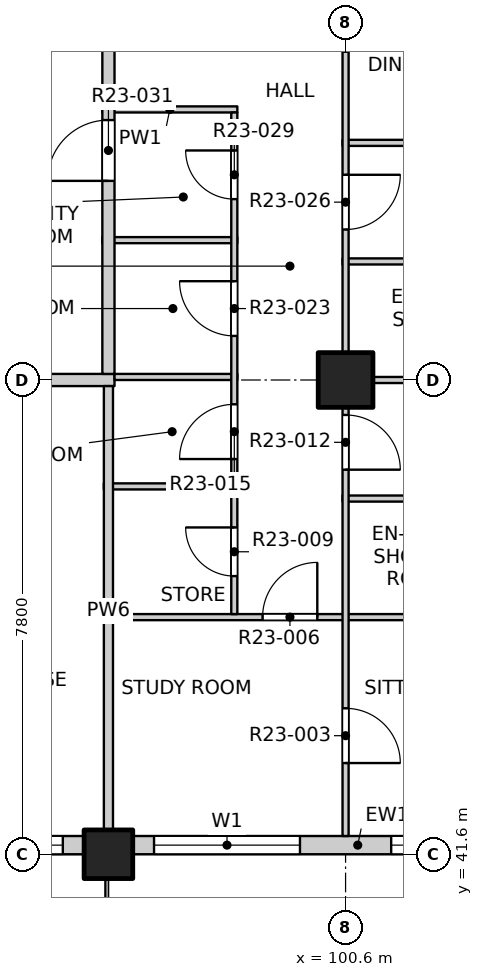
"""IFC4 building model, lengths in metres.
Left out: names, types, materials, properties, quantities, classifications, styles, units other than length and angle.
Written with IfcOpenShell. Run it as: python <this file> out.ifc"""

import sys

from ifc_helpers import new_model, si_unit, direction, frame, frame_2d, origin, origin_2d, place, context, subcontext, project, spatial, rectangle, extrude, element, fill, save


model = new_model("IFC4")
c1 = context("Model", 3, precision=1e-05, world=origin(), true_north=direction((0.0, 1.0)))
c2 = subcontext(c1, "Body", "Model", "MODEL_VIEW")
j1 = project(units=[si_unit("LENGTHUNIT", "METRE"), si_unit("PLANEANGLEUNIT", "RADIAN")], contexts=[c1])
p1 = place(None, origin())
s1 = spatial("IfcSite", under=j1, at=p1, CompositionType="ELEMENT")
p2 = place(p1, origin())
s2 = spatial("IfcBuilding", under=s1, at=p2, CompositionType="ELEMENT")
p3 = place(p2, frame((0.0, 0.0, 234.7)))
s3 = spatial("IfcBuildingStorey", under=s2, at=p3, CompositionType="ELEMENT", Elevation=234.7)
p4 = place(p3, frame((96.7, 41.6, -0.25), z_axis=(0.0, 0.0, 1.0), x_axis=(1.0, 0.0, 0.0)))
e1 = element("IfcColumn", 1, at=p4, inside=s3, PredefinedType="COLUMN", context=c2, shape_type="SweptSolid", body=[
    extrude(rectangle(XDim=0.8, YDim=0.8, at=origin_2d()), origin(), (0.0, 0.0, 1.0), 3.4),
])
p5 = place(p3, frame((100.6, 49.4, -0.25), z_axis=(0.0, 0.0, 1.0), x_axis=(1.0, 0.0, 0.0)))
e2 = element("IfcColumn", 2, at=p5, inside=s3, PredefinedType="COLUMN", context=c2, shape_type="SweptSolid", body=[
    extrude(rectangle(XDim=0.9, YDim=0.9, at=origin_2d()), origin(), (0.0, 0.0, 1.0), 3.4),
])
p6 = place(p3, frame((89.3, 41.75, 0.0), z_axis=(0.0, 0.0, 1.0), x_axis=(1.0, 0.0, 0.0)))
e3 = element("IfcWall", 3, at=p6, inside=s3, PredefinedType="SOLIDWALL", context=c2, shape_type="SweptSolid", body=[
    extrude(rectangle(XDim=7.0, YDim=0.3, at=frame_2d((3.5, 0.0))), origin(), (0.0, 0.0, 1.0), 2.7),
])
p7 = place(p6, frame((0.65, 0.0, 0.0)))
e4 = element("IfcOpeningElement", 4, at=p7, cuts=e3, PredefinedType="OPENING", context=c2, shape_type="SweptSolid", body=[
    extrude(rectangle(XDim=1.8, YDim=2.4, at=frame_2d((0.9, 1.2))), frame((0.0, 0.16, 0.0), z_axis=(0.0, -1.0, 0.0), x_axis=(1.0, 0.0, 0.0)), (0.0, 0.0, 1.0), 0.32),
])
p8 = place(p6, frame((4.25, 0.0, 0.9)))
e5 = element("IfcOpeningElement", 5, at=p8, cuts=e3, PredefinedType="OPENING", context=c2, shape_type="SweptSolid", body=[
    extrude(rectangle(XDim=2.4, YDim=1.8, at=frame_2d((1.2, 0.9))), frame((0.0, 0.16, 0.0), z_axis=(0.0, -1.0, 0.0), x_axis=(1.0, 0.0, 0.0)), (0.0, 0.0, 1.0), 0.32),
])
p9 = place(p3, frame((97.1, 41.75, 0.0), z_axis=(0.0, 0.0, 1.0), x_axis=(1.0, 0.0, 0.0)))
e6 = element("IfcWall", 6, at=p9, inside=s3, PredefinedType="SOLIDWALL", context=c2, shape_type="SweptSolid", body=[
    extrude(rectangle(XDim=7.4, YDim=0.3, at=frame_2d((3.7, 0.0))), origin(), (0.0, 0.0, 1.0), 2.7),
])
p10 = place(p9, frame((0.35, 0.0, 0.9)))
e7 = element("IfcOpeningElement", 7, at=p10, cuts=e6, PredefinedType="OPENING", context=c2, shape_type="SweptSolid", body=[
    extrude(rectangle(XDim=2.4, YDim=1.8, at=frame_2d((1.2, 0.9))), frame((0.0, 0.16, 0.0), z_axis=(0.0, -1.0, 0.0), x_axis=(1.0, 0.0, 0.0)), (0.0, 0.0, 1.0), 0.32),
])
p11 = place(p9, frame((4.25, 0.0, 0.9)))
e8 = element("IfcOpeningElement", 8, at=p11, cuts=e6, PredefinedType="OPENING", context=c2, shape_type="SweptSolid", body=[
    extrude(rectangle(XDim=2.4, YDim=1.8, at=frame_2d((1.2, 0.9))), frame((0.0, 0.16, 0.0), z_axis=(0.0, -1.0, 0.0), x_axis=(1.0, 0.0, 0.0)), (0.0, 0.0, 1.0), 0.32),
])
p12 = place(p3, frame((96.625, 45.5, 0.0), z_axis=(0.0, 0.0, 1.0), x_axis=(1.0, 0.0, 0.0)))
e9 = element("IfcWall", 9, at=p12, inside=s3, PredefinedType="PARTITIONING", context=c2, shape_type="SweptSolid", body=[
    extrude(rectangle(XDim=11.475, YDim=0.1, at=frame_2d((5.738, 0.0))), origin(), (0.0, 0.0, 1.0), 3.15),
])
p13 = place(p12, frame((2.61, 0.0, 0.0)))
e10 = element("IfcOpeningElement", 10, at=p13, cuts=e9, PredefinedType="OPENING", context=c2, shape_type="SweptSolid", body=[
    extrude(rectangle(XDim=0.9, YDim=2.1, at=frame_2d((0.45, 1.05))), frame((0.0, 0.06, 0.0), z_axis=(0.0, -1.0, 0.0), x_axis=(1.0, 0.0, 0.0)), (0.0, 0.0, 1.0), 0.12),
])
p14 = place(p3, frame((100.55, 47.45, 0.0), z_axis=(0.0, 0.0, 1.0), x_axis=(1.0, 0.0, 0.0)))
e11 = element("IfcWall", 11, at=p14, inside=s3, PredefinedType="PARTITIONING", context=c2, shape_type="SweptSolid", body=[
    extrude(rectangle(XDim=3.7, YDim=0.1, at=frame_2d((1.85, 0.0))), origin(), (0.0, 0.0, 1.0), 3.15),
])
p15 = place(p3, frame((96.625, 47.65, 0.0), z_axis=(0.0, 0.0, 1.0), x_axis=(1.0, 0.0, 0.0)))
e12 = element("IfcWall", 12, at=p15, inside=s3, PredefinedType="PARTITIONING", context=c2, shape_type="SweptSolid", body=[
    extrude(rectangle(XDim=2.195, YDim=0.1, at=frame_2d((1.098, 0.0))), origin(), (0.0, 0.0, 1.0), 3.15),
])
p16 = place(p3, frame((73.2, 49.4, 0.0), z_axis=(0.0, 0.0, 1.0), x_axis=(1.0, 0.0, 0.0)))
e13 = element("IfcWall", 13, at=p16, inside=s3, PredefinedType="PARTITIONING", context=c2, shape_type="SweptSolid", body=[
    extrude(rectangle(XDim=23.6, YDim=0.2, at=frame_2d((11.8, 0.0))), origin(), (0.0, 0.0, 1.0), 3.15),
])
p17 = place(p16, frame((2.25, 0.0, 0.0)))
e14 = element("IfcOpeningElement", 14, at=p17, cuts=e13, PredefinedType="OPENING", context=c2, shape_type="SweptSolid", body=[
    extrude(rectangle(XDim=1.2, YDim=2.1, at=frame_2d((0.6, 1.05))), frame((0.0, 0.11, 0.0), z_axis=(0.0, -1.0, 0.0), x_axis=(1.0, 0.0, 0.0)), (0.0, 0.0, 1.0), 0.22),
])
p18 = place(p16, frame((9.4, 0.0, 0.0)))
e15 = element("IfcOpeningElement", 15, at=p18, cuts=e13, PredefinedType="OPENING", context=c2, shape_type="SweptSolid", body=[
    extrude(rectangle(XDim=0.9, YDim=2.1, at=frame_2d((0.45, 1.05))), frame((0.0, 0.11, 0.0), z_axis=(0.0, -1.0, 0.0), x_axis=(1.0, 0.0, 0.0)), (0.0, 0.0, 1.0), 0.22),
])
p19 = place(p16, frame((15.1, 0.0, 0.0)))
e16 = element("IfcOpeningElement", 16, at=p19, cuts=e13, PredefinedType="OPENING", context=c2, shape_type="SweptSolid", body=[
    extrude(rectangle(XDim=1.2, YDim=2.1, at=frame_2d((0.6, 1.05))), frame((0.0, 0.11, 0.0), z_axis=(0.0, -1.0, 0.0), x_axis=(1.0, 0.0, 0.0)), (0.0, 0.0, 1.0), 0.22),
])
p20 = place(p16, frame((21.1, 0.0, 0.0)))
e17 = element("IfcOpeningElement", 17, at=p20, cuts=e13, PredefinedType="OPENING", context=c2, shape_type="SweptSolid", body=[
    extrude(rectangle(XDim=0.9, YDim=2.1, at=frame_2d((0.45, 1.05))), frame((0.0, 0.11, 0.0), z_axis=(0.0, -1.0, 0.0), x_axis=(1.0, 0.0, 0.0)), (0.0, 0.0, 1.0), 0.22),
])
p21 = place(p3, frame((100.55, 49.4, 0.0), z_axis=(0.0, 0.0, 1.0), x_axis=(1.0, 0.0, 0.0)))
e18 = element("IfcWall", 18, at=p21, inside=s3, PredefinedType="PARTITIONING", context=c2, shape_type="SweptSolid", body=[
    extrude(rectangle(XDim=7.55, YDim=0.1, at=frame_2d((3.775, 0.0))), origin(), (0.0, 0.0, 1.0), 3.15),
])
p22 = place(p3, frame((96.8, 49.45, 0.0), z_axis=(0.0, 0.0, 1.0), x_axis=(1.0, 0.0, 0.0)))
e19 = element("IfcWall", 19, at=p22, inside=s3, PredefinedType="PARTITIONING", context=c2, shape_type="SweptSolid", body=[
    extrude(rectangle(XDim=2.02, YDim=0.1, at=frame_2d((1.01, 0.0))), origin(), (0.0, 0.0, 1.0), 3.15),
])
p23 = place(p3, frame((100.55, 51.35, 0.0), z_axis=(0.0, 0.0, 1.0), x_axis=(1.0, 0.0, 0.0)))
e20 = element("IfcWall", 20, at=p23, inside=s3, PredefinedType="PARTITIONING", context=c2, shape_type="SweptSolid", body=[
    extrude(rectangle(XDim=3.7, YDim=0.1, at=frame_2d((1.85, 0.0))), origin(), (0.0, 0.0, 1.0), 3.15),
])
p24 = place(p3, frame((96.6, 51.7, 0.0), z_axis=(0.0, 0.0, 1.0), x_axis=(1.0, 0.0, 0.0)))
e21 = element("IfcWall", 21, at=p24, inside=s3, PredefinedType="PARTITIONING", context=c2, shape_type="SweptSolid", body=[
    extrude(rectangle(XDim=2.22, YDim=0.1, at=frame_2d((1.11, 0.0))), origin(), (0.0, 0.0, 1.0), 3.15),
])
p25 = place(p3, frame((100.55, 53.3, 0.0), z_axis=(0.0, 0.0, 1.0), x_axis=(1.0, 0.0, 0.0)))
e22 = element("IfcWall", 22, at=p25, inside=s3, PredefinedType="PARTITIONING", context=c2, shape_type="SweptSolid", body=[
    extrude(rectangle(XDim=7.55, YDim=0.1, at=frame_2d((3.775, 0.0))), origin(), (0.0, 0.0, 1.0), 3.15),
])
p26 = place(p3, frame((96.6, 53.85, 0.0), z_axis=(0.0, 0.0, 1.0), x_axis=(1.0, 0.0, 0.0)))
e23 = element("IfcWall", 23, at=p26, inside=s3, PredefinedType="PARTITIONING", context=c2, shape_type="SweptSolid", body=[
    extrude(rectangle(XDim=2.22, YDim=0.1, at=frame_2d((1.11, 0.0))), origin(), (0.0, 0.0, 1.0), 3.15),
])
p27 = place(p3, frame((96.7, 41.9, 0.0), z_axis=(0.0, 0.0, 1.0), x_axis=(0.0, 1.0, 0.0)))
e24 = element("IfcWall", 24, at=p27, inside=s3, PredefinedType="PARTITIONING", context=c2, shape_type="SweptSolid", body=[
    extrude(rectangle(XDim=7.4, YDim=0.15, at=frame_2d((3.7, 0.0))), origin(), (0.0, 0.0, 1.0), 3.15),
])
p28 = place(p3, frame((96.7, 49.5, 0.0), z_axis=(0.0, 0.0, 1.0), x_axis=(0.0, 1.0, 0.0)))
e25 = element("IfcWall", 25, at=p28, inside=s3, PredefinedType="PARTITIONING", context=c2, shape_type="SweptSolid", body=[
    extrude(rectangle(XDim=34.9, YDim=0.2, at=frame_2d((17.45, 0.0))), origin(), (0.0, 0.0, 1.0), 3.15),
])
p29 = place(p28, frame((3.175, 0.0, 0.0)))
e26 = element("IfcOpeningElement", 26, at=p29, cuts=e25, PredefinedType="OPENING", context=c2, shape_type="SweptSolid", body=[
    extrude(rectangle(XDim=1.0, YDim=2.1, at=frame_2d((0.5, 1.05))), frame((0.0, 0.11, 0.0), z_axis=(0.0, -1.0, 0.0), x_axis=(1.0, 0.0, 0.0)), (0.0, 0.0, 1.0), 0.22),
])
p30 = place(p28, frame((14.625, 0.0, 0.0)))
e27 = element("IfcOpeningElement", 27, at=p30, cuts=e25, PredefinedType="OPENING", context=c2, shape_type="SweptSolid", body=[
    extrude(rectangle(XDim=1.0, YDim=2.1, at=frame_2d((0.5, 1.05))), frame((0.0, 0.11, 0.0), z_axis=(0.0, -1.0, 0.0), x_axis=(1.0, 0.0, 0.0)), (0.0, 0.0, 1.0), 0.22),
])
p31 = place(p28, frame((30.175, 0.0, 0.0)))
e28 = element("IfcOpeningElement", 28, at=p31, cuts=e25, PredefinedType="OPENING", context=c2, shape_type="SweptSolid", body=[
    extrude(rectangle(XDim=1.0, YDim=2.1, at=frame_2d((0.5, 1.05))), frame((0.0, 0.11, 0.0), z_axis=(0.0, -1.0, 0.0), x_axis=(1.0, 0.0, 0.0)), (0.0, 0.0, 1.0), 0.22),
])
p32 = place(p3, frame((98.77, 45.55, 0.0), z_axis=(0.0, 0.0, 1.0), x_axis=(0.0, 1.0, 0.0)))
e29 = element("IfcWall", 29, at=p32, inside=s3, PredefinedType="PARTITIONING", context=c2, shape_type="SweptSolid", body=[
    extrude(rectangle(XDim=8.25, YDim=0.1, at=frame_2d((4.125, 0.0))), origin(), (0.0, 0.0, 1.0), 3.15),
])
p33 = place(p32, frame((0.625, 0.0, 0.0)))
e30 = element("IfcOpeningElement", 30, at=p33, cuts=e29, PredefinedType="OPENING", context=c2, shape_type="SweptSolid", body=[
    extrude(rectangle(XDim=0.8, YDim=2.1, at=frame_2d((0.4, 1.05))), frame((0.0, 0.06, 0.0), z_axis=(0.0, -1.0, 0.0), x_axis=(1.0, 0.0, 0.0)), (0.0, 0.0, 1.0), 0.12),
])
p34 = place(p32, frame((2.55, 0.0, 0.0)))
e31 = element("IfcOpeningElement", 31, at=p34, cuts=e29, PredefinedType="OPENING", context=c2, shape_type="SweptSolid", body=[
    extrude(rectangle(XDim=0.9, YDim=2.1, at=frame_2d((0.45, 1.05))), frame((0.0, 0.06, 0.0), z_axis=(0.0, -1.0, 0.0), x_axis=(1.0, 0.0, 0.0)), (0.0, 0.0, 1.0), 0.12),
])
p35 = place(p32, frame((4.575, 0.0, 0.0)))
e32 = element("IfcOpeningElement", 32, at=p35, cuts=e29, PredefinedType="OPENING", context=c2, shape_type="SweptSolid", body=[
    extrude(rectangle(XDim=0.9, YDim=2.1, at=frame_2d((0.45, 1.05))), frame((0.0, 0.06, 0.0), z_axis=(0.0, -1.0, 0.0), x_axis=(1.0, 0.0, 0.0)), (0.0, 0.0, 1.0), 0.12),
])
p36 = place(p32, frame((6.825, 0.0, 0.0)))
e33 = element("IfcOpeningElement", 33, at=p36, cuts=e29, PredefinedType="OPENING", context=c2, shape_type="SweptSolid", body=[
    extrude(rectangle(XDim=0.8, YDim=2.1, at=frame_2d((0.4, 1.05))), frame((0.0, 0.06, 0.0), z_axis=(0.0, -1.0, 0.0), x_axis=(1.0, 0.0, 0.0)), (0.0, 0.0, 1.0), 0.12),
])
p37 = place(p3, frame((100.6, 41.9, 0.0), z_axis=(0.0, 0.0, 1.0), x_axis=(0.0, 1.0, 0.0)))
e34 = element("IfcWall", 34, at=p37, inside=s3, PredefinedType="PARTITIONING", context=c2, shape_type="SweptSolid", body=[
    extrude(rectangle(XDim=46.2, YDim=0.1, at=frame_2d((23.1, 0.0))), origin(), (0.0, 0.0, 1.0), 3.15),
])
p38 = place(p37, frame((1.2, 0.0, 0.0)))
e35 = element("IfcOpeningElement", 35, at=p38, cuts=e34, PredefinedType="OPENING", context=c2, shape_type="SweptSolid", body=[
    extrude(rectangle(XDim=0.9, YDim=2.1, at=frame_2d((0.45, 1.05))), frame((0.0, 0.06, 0.0), z_axis=(0.0, -1.0, 0.0), x_axis=(1.0, 0.0, 0.0)), (0.0, 0.0, 1.0), 0.12),
])
p39 = place(p37, frame((6.025, 0.0, 0.0)))
e36 = element("IfcOpeningElement", 36, at=p39, cuts=e34, PredefinedType="OPENING", context=c2, shape_type="SweptSolid", body=[
    extrude(rectangle(XDim=0.9, YDim=2.1, at=frame_2d((0.45, 1.05))), frame((0.0, 0.06, 0.0), z_axis=(0.0, -1.0, 0.0), x_axis=(1.0, 0.0, 0.0)), (0.0, 0.0, 1.0), 0.12),
])
p40 = place(p37, frame((9.975, 0.0, 0.0)))
e37 = element("IfcOpeningElement", 37, at=p40, cuts=e34, PredefinedType="OPENING", context=c2, shape_type="SweptSolid", body=[
    extrude(rectangle(XDim=0.9, YDim=2.1, at=frame_2d((0.45, 1.05))), frame((0.0, 0.06, 0.0), z_axis=(0.0, -1.0, 0.0), x_axis=(1.0, 0.0, 0.0)), (0.0, 0.0, 1.0), 0.12),
])
p41 = place(p37, frame((12.9, 0.0, 0.0)))
e38 = element("IfcOpeningElement", 38, at=p41, cuts=e34, PredefinedType="OPENING", context=c2, shape_type="SweptSolid", body=[
    extrude(rectangle(XDim=0.9, YDim=2.1, at=frame_2d((0.45, 1.05))), frame((0.0, 0.06, 0.0), z_axis=(0.0, -1.0, 0.0), x_axis=(1.0, 0.0, 0.0)), (0.0, 0.0, 1.0), 0.12),
])
p42 = place(p37, frame((17.775, 0.0, 0.0)))
e39 = element("IfcOpeningElement", 39, at=p42, cuts=e34, PredefinedType="OPENING", context=c2, shape_type="SweptSolid", body=[
    extrude(rectangle(XDim=0.9, YDim=2.1, at=frame_2d((0.45, 1.05))), frame((0.0, 0.06, 0.0), z_axis=(0.0, -1.0, 0.0), x_axis=(1.0, 0.0, 0.0)), (0.0, 0.0, 1.0), 0.12),
])
p43 = place(p37, frame((21.625, 0.0, 0.0)))
e40 = element("IfcOpeningElement", 40, at=p43, cuts=e34, PredefinedType="OPENING", context=c2, shape_type="SweptSolid", body=[
    extrude(rectangle(XDim=0.9, YDim=2.1, at=frame_2d((0.45, 1.05))), frame((0.0, 0.06, 0.0), z_axis=(0.0, -1.0, 0.0), x_axis=(1.0, 0.0, 0.0)), (0.0, 0.0, 1.0), 0.12),
])
p44 = place(p37, frame((25.575, 0.0, 0.0)))
e41 = element("IfcOpeningElement", 41, at=p44, cuts=e34, PredefinedType="OPENING", context=c2, shape_type="SweptSolid", body=[
    extrude(rectangle(XDim=0.9, YDim=2.1, at=frame_2d((0.45, 1.05))), frame((0.0, 0.06, 0.0), z_axis=(0.0, -1.0, 0.0), x_axis=(1.0, 0.0, 0.0)), (0.0, 0.0, 1.0), 0.12),
])
p45 = place(p37, frame((28.5, 0.0, 0.0)))
e42 = element("IfcOpeningElement", 42, at=p45, cuts=e34, PredefinedType="OPENING", context=c2, shape_type="SweptSolid", body=[
    extrude(rectangle(XDim=0.9, YDim=2.1, at=frame_2d((0.45, 1.05))), frame((0.0, 0.06, 0.0), z_axis=(0.0, -1.0, 0.0), x_axis=(1.0, 0.0, 0.0)), (0.0, 0.0, 1.0), 0.12),
])
p46 = place(p37, frame((33.375, 0.0, 0.0)))
e43 = element("IfcOpeningElement", 43, at=p46, cuts=e34, PredefinedType="OPENING", context=c2, shape_type="SweptSolid", body=[
    extrude(rectangle(XDim=0.9, YDim=2.1, at=frame_2d((0.45, 1.05))), frame((0.0, 0.06, 0.0), z_axis=(0.0, -1.0, 0.0), x_axis=(1.0, 0.0, 0.0)), (0.0, 0.0, 1.0), 0.12),
])
p47 = place(p37, frame((36.3, 0.0, 0.0)))
e44 = element("IfcOpeningElement", 44, at=p47, cuts=e34, PredefinedType="OPENING", context=c2, shape_type="SweptSolid", body=[
    extrude(rectangle(XDim=0.9, YDim=2.1, at=frame_2d((0.45, 1.05))), frame((0.0, 0.06, 0.0), z_axis=(0.0, -1.0, 0.0), x_axis=(1.0, 0.0, 0.0)), (0.0, 0.0, 1.0), 0.12),
])
p48 = place(p37, frame((40.2, 0.0, 0.0)))
e45 = element("IfcOpeningElement", 45, at=p48, cuts=e34, PredefinedType="OPENING", context=c2, shape_type="SweptSolid", body=[
    extrude(rectangle(XDim=0.9, YDim=2.1, at=frame_2d((0.45, 1.05))), frame((0.0, 0.06, 0.0), z_axis=(0.0, -1.0, 0.0), x_axis=(1.0, 0.0, 0.0)), (0.0, 0.0, 1.0), 0.12),
])
p49 = place(p37, frame((44.1, 0.0, 0.0)))
e46 = element("IfcOpeningElement", 46, at=p49, cuts=e34, PredefinedType="OPENING", context=c2, shape_type="SweptSolid", body=[
    extrude(rectangle(XDim=0.9, YDim=2.1, at=frame_2d((0.45, 1.05))), frame((0.0, 0.06, 0.0), z_axis=(0.0, -1.0, 0.0), x_axis=(1.0, 0.0, 0.0)), (0.0, 0.0, 1.0), 0.12),
])
p50 = place(p8, origin())
e47 = element("IfcWindow", 47, at=p50, inside=s3, PartitioningType="DOUBLE_PANEL_VERTICAL", PredefinedType="WINDOW", context=c2, shape_type="SweptSolid", body=[
    extrude(rectangle(XDim=2.4, YDim=1.8, at=frame_2d((1.2, 0.9))), frame((0.0, 0.03, 0.0), z_axis=(0.0, -1.0, 0.0), x_axis=(1.0, 0.0, 0.0)), (0.0, 0.0, 1.0), 0.06),
])
fill(e5, e47)
p51 = place(p10, origin())
e48 = element("IfcWindow", 48, at=p51, inside=s3, PartitioningType="DOUBLE_PANEL_VERTICAL", PredefinedType="WINDOW", context=c2, shape_type="SweptSolid", body=[
    extrude(rectangle(XDim=2.4, YDim=1.8, at=frame_2d((1.2, 0.9))), frame((0.0, 0.03, 0.0), z_axis=(0.0, -1.0, 0.0), x_axis=(1.0, 0.0, 0.0)), (0.0, 0.0, 1.0), 0.06),
])
fill(e7, e48)
p52 = place(p11, origin())
e49 = element("IfcWindow", 49, at=p52, inside=s3, PartitioningType="DOUBLE_PANEL_VERTICAL", PredefinedType="WINDOW", context=c2, shape_type="SweptSolid", body=[
    extrude(rectangle(XDim=2.4, YDim=1.8, at=frame_2d((1.2, 0.9))), frame((0.0, 0.03, 0.0), z_axis=(0.0, -1.0, 0.0), x_axis=(1.0, 0.0, 0.0)), (0.0, 0.0, 1.0), 0.06),
])
fill(e8, e49)
p53 = place(p38, origin())
e50 = element("IfcDoor", 50, at=p53, inside=s3, OperationType="SINGLE_SWING_RIGHT", PredefinedType="DOOR", context=c2, shape_type="SweptSolid", body=[
    extrude(rectangle(XDim=0.9, YDim=2.1, at=frame_2d((0.45, 1.05))), frame((0.0, 0.025, 0.0), z_axis=(0.0, -1.0, 0.0), x_axis=(1.0, 0.0, 0.0)), (0.0, 0.0, 1.0), 0.05),
])
fill(e35, e50)
p54 = place(p13, origin())
e51 = element("IfcDoor", 51, at=p54, inside=s3, OperationType="SINGLE_SWING_RIGHT", PredefinedType="DOOR", context=c2, shape_type="SweptSolid", body=[
    extrude(rectangle(XDim=0.9, YDim=2.1, at=frame_2d((0.45, 1.05))), frame((0.0, 0.025, 0.0), z_axis=(0.0, -1.0, 0.0), x_axis=(1.0, 0.0, 0.0)), (0.0, 0.0, 1.0), 0.05),
])
fill(e10, e51)
p55 = place(p33, origin())
e52 = element("IfcDoor", 52, at=p55, inside=s3, OperationType="SINGLE_SWING_RIGHT", PredefinedType="DOOR", context=c2, shape_type="SweptSolid", body=[
    extrude(rectangle(XDim=0.8, YDim=2.1, at=frame_2d((0.4, 1.05))), frame((0.0, 0.025, 0.0), z_axis=(0.0, -1.0, 0.0), x_axis=(1.0, 0.0, 0.0)), (0.0, 0.0, 1.0), 0.05),
])
fill(e30, e52)
p56 = place(p39, origin())
e53 = element("IfcDoor", 53, at=p56, inside=s3, OperationType="SINGLE_SWING_RIGHT", PredefinedType="DOOR", context=c2, shape_type="SweptSolid", body=[
    extrude(rectangle(XDim=0.9, YDim=2.1, at=frame_2d((0.45, 1.05))), frame((0.0, 0.025, 0.0), z_axis=(0.0, -1.0, 0.0), x_axis=(1.0, 0.0, 0.0)), (0.0, 0.0, 1.0), 0.05),
])
fill(e36, e53)
p57 = place(p34, origin())
e54 = element("IfcDoor", 54, at=p57, inside=s3, OperationType="SINGLE_SWING_LEFT", PredefinedType="DOOR", context=c2, shape_type="SweptSolid", body=[
    extrude(rectangle(XDim=0.9, YDim=2.1, at=frame_2d((0.45, 1.05))), frame((0.0, 0.025, 0.0), z_axis=(0.0, -1.0, 0.0), x_axis=(1.0, 0.0, 0.0)), (0.0, 0.0, 1.0), 0.05),
])
fill(e31, e54)
p58 = place(p35, origin())
e55 = element("IfcDoor", 55, at=p58, inside=s3, OperationType="SINGLE_SWING_RIGHT", PredefinedType="DOOR", context=c2, shape_type="SweptSolid", body=[
    extrude(rectangle(XDim=0.9, YDim=2.1, at=frame_2d((0.45, 1.05))), frame((0.0, 0.025, 0.0), z_axis=(0.0, -1.0, 0.0), x_axis=(1.0, 0.0, 0.0)), (0.0, 0.0, 1.0), 0.05),
])
fill(e32, e55)
p59 = place(p40, origin())
e56 = element("IfcDoor", 56, at=p59, inside=s3, OperationType="SINGLE_SWING_LEFT", PredefinedType="DOOR", context=c2, shape_type="SweptSolid", body=[
    extrude(rectangle(XDim=0.9, YDim=2.1, at=frame_2d((0.45, 1.05))), frame((0.0, 0.025, 0.0), z_axis=(0.0, -1.0, 0.0), x_axis=(1.0, 0.0, 0.0)), (0.0, 0.0, 1.0), 0.05),
])
fill(e37, e56)
p60 = place(p36, origin())
e57 = element("IfcDoor", 57, at=p60, inside=s3, OperationType="SINGLE_SWING_RIGHT", PredefinedType="DOOR", context=c2, shape_type="SweptSolid", body=[
    extrude(rectangle(XDim=0.8, YDim=2.1, at=frame_2d((0.4, 1.05))), frame((0.0, 0.025, 0.0), z_axis=(0.0, -1.0, 0.0), x_axis=(1.0, 0.0, 0.0)), (0.0, 0.0, 1.0), 0.05),
])
fill(e33, e57)
p61 = place(p29, origin())
e58 = element("IfcDoor", 58, at=p61, inside=s3, OperationType="SINGLE_SWING_RIGHT", PredefinedType="DOOR", context=c2, shape_type="SweptSolid", body=[
    extrude(rectangle(XDim=1.0, YDim=2.1, at=frame_2d((0.5, 1.05))), frame((0.0, 0.025, 0.0), z_axis=(0.0, -1.0, 0.0), x_axis=(1.0, 0.0, 0.0)), (0.0, 0.0, 1.0), 0.05),
])
fill(e26, e58)
save(model, sys.argv[1])
